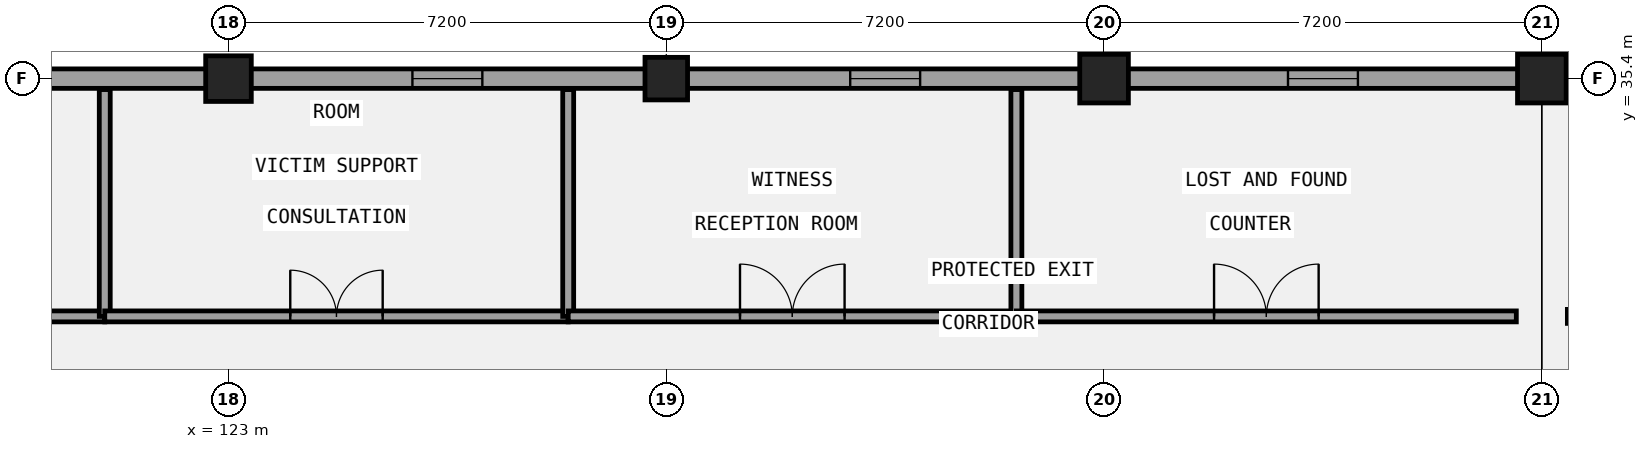
"""IFC4 building model, lengths in metres.
Left out: names, types, materials, properties, quantities, classifications, styles, units other than length and angle.
Written with IfcOpenShell. Run it as: python <this file> out.ifc"""

import sys

from ifc_helpers import new_model, si_unit, direction, frame, frame_2d, origin, origin_2d, place, context, subcontext, project, spatial, rectangle, circle, extrude, element, fill, save


model = new_model("IFC4")
c1 = context("Model", 3, precision=1e-05, world=origin(), true_north=direction((0.0, 1.0)))
c2 = subcontext(c1, "Body", "Model", "MODEL_VIEW")
j1 = project(units=[si_unit("LENGTHUNIT", "METRE"), si_unit("PLANEANGLEUNIT", "RADIAN")], contexts=[c1])
p1 = place(None, origin())
s1 = spatial("IfcSite", under=j1, at=p1, CompositionType="ELEMENT")
p2 = place(p1, origin())
s2 = spatial("IfcBuilding", under=s1, at=p2, CompositionType="ELEMENT")
p3 = place(p2, origin())
s3 = spatial("IfcBuildingStorey", under=s2, at=p3, CompositionType="ELEMENT", Elevation=0.0)
p4 = place(p3, frame((123.0, 35.4, 0.0), z_axis=(0.0, 0.0, 1.0), x_axis=(1.0, 0.0, 0.0)))
e1 = element("IfcColumn", 1, at=p4, inside=s3, PredefinedType="COLUMN", context=c2, shape_type="SweptSolid", body=[
    extrude(rectangle(XDim=0.75, YDim=0.75, at=origin_2d()), origin(), (0.0, 0.0, 1.0), 5.4),
])
p5 = place(p3, frame((130.2, 35.4, 0.0), z_axis=(0.0, 0.0, 1.0), x_axis=(1.0, 0.0, 0.0)))
e2 = element("IfcColumn", 2, at=p5, inside=s3, PredefinedType="COLUMN", context=c2, shape_type="SweptSolid", body=[
    extrude(rectangle(XDim=0.7, YDim=0.7, at=origin_2d()), origin(), (0.0, 0.0, 1.0), 5.4),
])
p6 = place(p3, frame((137.4, 35.4, 0.0), z_axis=(0.0, 0.0, 1.0), x_axis=(1.0, 0.0, 0.0)))
e3 = element("IfcColumn", 3, at=p6, inside=s3, PredefinedType="COLUMN", context=c2, shape_type="SweptSolid", body=[
    extrude(rectangle(XDim=0.8, YDim=0.8, at=origin_2d()), origin(), (0.0, 0.0, 1.0), 5.4),
])
p7 = place(p3, frame((144.6, 35.4, 0.0), z_axis=(0.0, 0.0, 1.0), x_axis=(1.0, 0.0, 0.0)))
e4 = element("IfcColumn", 4, at=p7, inside=s3, PredefinedType="COLUMN", context=c2, shape_type="SweptSolid", body=[
    extrude(circle(Radius=0.4, at=origin_2d()), origin(), (0.0, 0.0, 1.0), 5.4),
])
p8 = place(p3, frame((144.6, 78.44, 0.0), z_axis=(0.0, 0.0, 1.0), x_axis=(0.0, -1.0, 0.0)))
e5 = element("IfcWall", 5, at=p8, inside=s3, PredefinedType="SOLIDWALL", context=c2, shape_type="SweptSolid", body=[
    extrude(rectangle(XDim=42.88, YDim=0.32, at=frame_2d((21.44, 0.0))), origin(), (0.0, 0.0, 1.0), 4.12),
])
p9 = place(p8, frame((38.86, 0.0, 1.0)))
e6 = element("IfcOpeningElement", 6, at=p9, cuts=e5, PredefinedType="OPENING", context=c2, shape_type="SweptSolid", body=[
    extrude(rectangle(XDim=1.0, YDim=2.4, at=frame_2d((0.5, 1.2))), frame((0.0, 0.17, 0.0), z_axis=(0.0, -1.0, 0.0), x_axis=(1.0, 0.0, 0.0)), (0.0, 0.0, 1.0), 0.34),
])
p10 = place(p8, frame((31.74, 0.0, 1.0)))
e7 = element("IfcOpeningElement", 7, at=p10, cuts=e5, PredefinedType="OPENING", context=c2, shape_type="SweptSolid", body=[
    extrude(rectangle(XDim=1.0, YDim=2.4, at=frame_2d((0.5, 1.2))), frame((0.0, 0.17, 0.0), z_axis=(0.0, -1.0, 0.0), x_axis=(1.0, 0.0, 0.0)), (0.0, 0.0, 1.0), 0.34),
])
p11 = place(p8, frame((24.54, 0.0, 1.0)))
e8 = element("IfcOpeningElement", 8, at=p11, cuts=e5, PredefinedType="OPENING", context=c2, shape_type="SweptSolid", body=[
    extrude(rectangle(XDim=1.0, YDim=2.4, at=frame_2d((0.5, 1.2))), frame((0.0, 0.17, 0.0), z_axis=(0.0, -1.0, 0.0), x_axis=(1.0, 0.0, 0.0)), (0.0, 0.0, 1.0), 0.34),
])
p12 = place(p8, frame((17.34, 0.0, 1.0)))
e9 = element("IfcOpeningElement", 9, at=p12, cuts=e5, PredefinedType="OPENING", context=c2, shape_type="SweptSolid", body=[
    extrude(rectangle(XDim=1.0, YDim=2.4, at=frame_2d((0.5, 1.2))), frame((0.0, 0.17, 0.0), z_axis=(0.0, -1.0, 0.0), x_axis=(1.0, 0.0, 0.0)), (0.0, 0.0, 1.0), 0.34),
])
p13 = place(p8, frame((10.14, 0.0, 1.0)))
e10 = element("IfcOpeningElement", 10, at=p13, cuts=e5, PredefinedType="OPENING", context=c2, shape_type="SweptSolid", body=[
    extrude(rectangle(XDim=1.0, YDim=2.4, at=frame_2d((0.5, 1.2))), frame((0.0, 0.17, 0.0), z_axis=(0.0, -1.0, 0.0), x_axis=(1.0, 0.0, 0.0)), (0.0, 0.0, 1.0), 0.34),
])
p14 = place(p8, frame((3.02, 0.0, 1.0)))
e11 = element("IfcOpeningElement", 11, at=p14, cuts=e5, PredefinedType="OPENING", context=c2, shape_type="SweptSolid", body=[
    extrude(rectangle(XDim=1.0, YDim=2.4, at=frame_2d((0.5, 1.2))), frame((0.0, 0.17, 0.0), z_axis=(0.0, -1.0, 0.0), x_axis=(1.0, 0.0, 0.0)), (0.0, 0.0, 1.0), 0.34),
])
p15 = place(p3, frame((144.76, 35.4, 0.0), z_axis=(0.0, 0.0, 1.0), x_axis=(-1.0, 0.0, 0.0)))
e12 = element("IfcWall", 12, at=p15, inside=s3, PredefinedType="SOLIDWALL", context=c2, shape_type="SweptSolid", body=[
    extrude(rectangle(XDim=50.31, YDim=0.32, at=frame_2d((25.155, 0.0))), origin(), (0.0, 0.0, 1.0), 4.12),
])
p16 = place(p15, frame((46.26, 0.0, 1.0)))
e13 = element("IfcOpeningElement", 13, at=p16, cuts=e12, PredefinedType="OPENING", context=c2, shape_type="SweptSolid", body=[
    extrude(rectangle(XDim=1.15, YDim=1.4, at=frame_2d((0.575, 0.7))), frame((0.0, 0.17, 0.0), z_axis=(0.0, -1.0, 0.0), x_axis=(1.0, 0.0, 0.0)), (0.0, 0.0, 1.0), 0.34),
])
p17 = place(p15, frame((39.185, 0.0, 1.0)))
e14 = element("IfcOpeningElement", 14, at=p17, cuts=e12, PredefinedType="OPENING", context=c2, shape_type="SweptSolid", body=[
    extrude(rectangle(XDim=1.15, YDim=1.4, at=frame_2d((0.575, 0.7))), frame((0.0, 0.17, 0.0), z_axis=(0.0, -1.0, 0.0), x_axis=(1.0, 0.0, 0.0)), (0.0, 0.0, 1.0), 0.34),
])
p18 = place(p15, frame((31.985, 0.0, 1.0)))
e15 = element("IfcOpeningElement", 15, at=p18, cuts=e12, PredefinedType="OPENING", context=c2, shape_type="SweptSolid", body=[
    extrude(rectangle(XDim=1.15, YDim=1.4, at=frame_2d((0.575, 0.7))), frame((0.0, 0.17, 0.0), z_axis=(0.0, -1.0, 0.0), x_axis=(1.0, 0.0, 0.0)), (0.0, 0.0, 1.0), 0.34),
])
p19 = place(p15, frame((24.785, 0.0, 1.0)))
e16 = element("IfcOpeningElement", 16, at=p19, cuts=e12, PredefinedType="OPENING", context=c2, shape_type="SweptSolid", body=[
    extrude(rectangle(XDim=1.15, YDim=1.4, at=frame_2d((0.575, 0.7))), frame((0.0, 0.17, 0.0), z_axis=(0.0, -1.0, 0.0), x_axis=(1.0, 0.0, 0.0)), (0.0, 0.0, 1.0), 0.34),
])
p20 = place(p15, frame((17.585, 0.0, 1.0)))
e17 = element("IfcOpeningElement", 17, at=p20, cuts=e12, PredefinedType="OPENING", context=c2, shape_type="SweptSolid", body=[
    extrude(rectangle(XDim=1.15, YDim=1.4, at=frame_2d((0.575, 0.7))), frame((0.0, 0.17, 0.0), z_axis=(0.0, -1.0, 0.0), x_axis=(1.0, 0.0, 0.0)), (0.0, 0.0, 1.0), 0.34),
])
p21 = place(p15, frame((10.385, 0.0, 1.0)))
e18 = element("IfcOpeningElement", 18, at=p21, cuts=e12, PredefinedType="OPENING", context=c2, shape_type="SweptSolid", body=[
    extrude(rectangle(XDim=1.15, YDim=1.4, at=frame_2d((0.575, 0.7))), frame((0.0, 0.17, 0.0), z_axis=(0.0, -1.0, 0.0), x_axis=(1.0, 0.0, 0.0)), (0.0, 0.0, 1.0), 0.34),
])
p22 = place(p15, frame((3.185, 0.0, 1.0)))
e19 = element("IfcOpeningElement", 19, at=p22, cuts=e12, PredefinedType="OPENING", context=c2, shape_type="SweptSolid", body=[
    extrude(rectangle(XDim=1.15, YDim=1.4, at=frame_2d((0.575, 0.7))), frame((0.0, 0.17, 0.0), z_axis=(0.0, -1.0, 0.0), x_axis=(1.0, 0.0, 0.0)), (0.0, 0.0, 1.0), 0.34),
])
p23 = place(p3, frame((110.443, 31.49, 0.0), z_axis=(0.0, 0.0, 1.0), x_axis=(1.0, 0.0, 0.0)))
e20 = element("IfcWall", 20, at=p23, inside=s3, PredefinedType="PARTITIONING", context=c2, shape_type="SweptSolid", body=[
    extrude(rectangle(XDim=10.522, YDim=0.18, at=frame_2d((5.261, 0.0))), origin(), (0.0, 0.0, 1.0), 5.12),
])
p24 = place(p23, frame((4.501, 0.0, 0.0)))
e21 = element("IfcOpeningElement", 21, at=p24, cuts=e20, PredefinedType="OPENING", context=c2, shape_type="SweptSolid", body=[
    extrude(rectangle(XDim=1.52, YDim=2.22, at=frame_2d((0.76, 1.11))), frame((0.0, 0.1, 0.0), z_axis=(0.0, -1.0, 0.0), x_axis=(1.0, 0.0, 0.0)), (0.0, 0.0, 1.0), 0.2),
])
p25 = place(p3, frame((120.965, 31.49, 0.0), z_axis=(0.0, 0.0, 1.0), x_axis=(0.0, 1.0, 0.0)))
e22 = element("IfcWall", 22, at=p25, inside=s3, PredefinedType="PARTITIONING", context=c2, shape_type="SweptSolid", body=[
    extrude(rectangle(XDim=3.73, YDim=0.18, at=frame_2d((1.865, 0.0))), origin(), (0.0, 0.0, 1.0), 5.12),
])
p26 = place(p3, frame((120.965, 31.49, 0.0), z_axis=(0.0, 0.0, 1.0), x_axis=(1.0, 0.0, 0.0)))
e23 = element("IfcWall", 23, at=p26, inside=s3, PredefinedType="PARTITIONING", context=c2, shape_type="SweptSolid", body=[
    extrude(rectangle(XDim=7.622, YDim=0.18, at=frame_2d((3.811, 0.0))), origin(), (0.0, 0.0, 1.0), 5.12),
])
p27 = place(p26, frame((3.051, 0.0, 0.0)))
e24 = element("IfcOpeningElement", 24, at=p27, cuts=e23, PredefinedType="OPENING", context=c2, shape_type="SweptSolid", body=[
    extrude(rectangle(XDim=1.52, YDim=2.35, at=frame_2d((0.76, 1.175))), frame((0.0, 0.1, 0.0), z_axis=(0.0, -1.0, 0.0), x_axis=(1.0, 0.0, 0.0)), (0.0, 0.0, 1.0), 0.2),
])
p28 = place(p3, frame((128.587, 31.49, 0.0), z_axis=(0.0, 0.0, 1.0), x_axis=(0.0, 1.0, 0.0)))
e25 = element("IfcWall", 25, at=p28, inside=s3, PredefinedType="PARTITIONING", context=c2, shape_type="SweptSolid", body=[
    extrude(rectangle(XDim=3.73, YDim=0.18, at=frame_2d((1.865, 0.0))), origin(), (0.0, 0.0, 1.0), 5.12),
])
p29 = place(p3, frame((128.587, 31.49, 0.0), z_axis=(0.0, 0.0, 1.0), x_axis=(1.0, 0.0, 0.0)))
e26 = element("IfcWall", 26, at=p29, inside=s3, PredefinedType="PARTITIONING", context=c2, shape_type="SweptSolid", body=[
    extrude(rectangle(XDim=7.371, YDim=0.18, at=frame_2d((3.686, 0.0))), origin(), (0.0, 0.0, 1.0), 5.12),
])
p30 = place(p29, frame((2.825, 0.0, 0.0)))
e27 = element("IfcOpeningElement", 27, at=p30, cuts=e26, PredefinedType="OPENING", context=c2, shape_type="SweptSolid", body=[
    extrude(rectangle(XDim=1.72, YDim=2.1, at=frame_2d((0.86, 1.05))), frame((0.0, 0.1, 0.0), z_axis=(0.0, -1.0, 0.0), x_axis=(1.0, 0.0, 0.0)), (0.0, 0.0, 1.0), 0.2),
])
p31 = place(p3, frame((135.958, 31.49, 0.0), z_axis=(0.0, 0.0, 1.0), x_axis=(0.0, 1.0, 0.0)))
e28 = element("IfcWall", 28, at=p31, inside=s3, PredefinedType="PARTITIONING", context=c2, shape_type="SweptSolid", body=[
    extrude(rectangle(XDim=3.73, YDim=0.18, at=frame_2d((1.865, 0.0))), origin(), (0.0, 0.0, 1.0), 5.12),
])
p32 = place(p3, frame((135.958, 31.49, 0.0), z_axis=(0.0, 0.0, 1.0), x_axis=(1.0, 0.0, 0.0)))
e29 = element("IfcWall", 29, at=p32, inside=s3, PredefinedType="PARTITIONING", context=c2, shape_type="SweptSolid", body=[
    extrude(rectangle(XDim=8.222, YDim=0.18, at=frame_2d((4.111, 0.0))), origin(), (0.0, 0.0, 1.0), 5.12),
])
p33 = place(p32, frame((3.251, 0.0, 0.0)))
e30 = element("IfcOpeningElement", 30, at=p33, cuts=e29, PredefinedType="OPENING", context=c2, shape_type="SweptSolid", body=[
    extrude(rectangle(XDim=1.72, YDim=2.22, at=frame_2d((0.86, 1.11))), frame((0.0, 0.1, 0.0), z_axis=(0.0, -1.0, 0.0), x_axis=(1.0, 0.0, 0.0)), (0.0, 0.0, 1.0), 0.2),
])
p34 = place(p3, frame((145.02, 31.49, 0.0), z_axis=(0.0, 0.0, 1.0), x_axis=(1.0, 0.0, 0.0)))
e31 = element("IfcWall", 31, at=p34, inside=s3, PredefinedType="PARTITIONING", context=c2, shape_type="SweptSolid", body=[
    extrude(rectangle(XDim=9.52, YDim=0.23, at=frame_2d((4.76, 0.0))), origin(), (0.0, 0.0, 1.0), 4.57),
])
p35 = place(p34, frame((3.9, 0.0, 0.0)))
e32 = element("IfcOpeningElement", 32, at=p35, cuts=e31, PredefinedType="OPENING", context=c2, shape_type="SweptSolid", body=[
    extrude(rectangle(XDim=1.72, YDim=2.22, at=frame_2d((0.86, 1.11))), frame((0.0, 0.125, 0.0), z_axis=(0.0, -1.0, 0.0), x_axis=(1.0, 0.0, 0.0)), (0.0, 0.0, 1.0), 0.25),
])
p36 = place(p20, origin())
e33 = element("IfcWindow", 33, at=p36, inside=s3, PartitioningType="SINGLE_PANEL", PredefinedType="WINDOW", context=c2, shape_type="SweptSolid", body=[
    extrude(rectangle(XDim=1.15, YDim=1.4, at=frame_2d((0.575, 0.7))), frame((0.0, 0.03, 0.0), z_axis=(0.0, -1.0, 0.0), x_axis=(1.0, 0.0, 0.0)), (0.0, 0.0, 1.0), 0.06),
])
fill(e17, e33)
p37 = place(p21, origin())
e34 = element("IfcWindow", 34, at=p37, inside=s3, PartitioningType="SINGLE_PANEL", PredefinedType="WINDOW", context=c2, shape_type="SweptSolid", body=[
    extrude(rectangle(XDim=1.15, YDim=1.4, at=frame_2d((0.575, 0.7))), frame((0.0, 0.03, 0.0), z_axis=(0.0, -1.0, 0.0), x_axis=(1.0, 0.0, 0.0)), (0.0, 0.0, 1.0), 0.06),
])
fill(e18, e34)
p38 = place(p22, origin())
e35 = element("IfcWindow", 35, at=p38, inside=s3, PartitioningType="SINGLE_PANEL", PredefinedType="WINDOW", context=c2, shape_type="SweptSolid", body=[
    extrude(rectangle(XDim=1.15, YDim=1.4, at=frame_2d((0.575, 0.7))), frame((0.0, 0.03, 0.0), z_axis=(0.0, -1.0, 0.0), x_axis=(1.0, 0.0, 0.0)), (0.0, 0.0, 1.0), 0.06),
])
fill(e19, e35)
p39 = place(p27, origin())
e36 = element("IfcDoor", 36, at=p39, inside=s3, OperationType="DOUBLE_DOOR_SINGLE_SWING", PredefinedType="DOOR", context=c2, shape_type="SweptSolid", body=[
    extrude(rectangle(XDim=1.52, YDim=2.35, at=frame_2d((0.76, 1.175))), frame((0.0, 0.025, 0.0), z_axis=(0.0, -1.0, 0.0), x_axis=(1.0, 0.0, 0.0)), (0.0, 0.0, 1.0), 0.05),
])
fill(e24, e36)
p40 = place(p30, origin())
e37 = element("IfcDoor", 37, at=p40, inside=s3, OperationType="DOUBLE_DOOR_SINGLE_SWING", PredefinedType="DOOR", context=c2, shape_type="SweptSolid", body=[
    extrude(rectangle(XDim=1.72, YDim=2.1, at=frame_2d((0.86, 1.05))), frame((0.0, 0.025, 0.0), z_axis=(0.0, -1.0, 0.0), x_axis=(1.0, 0.0, 0.0)), (0.0, 0.0, 1.0), 0.05),
])
fill(e27, e37)
p41 = place(p33, origin())
e38 = element("IfcDoor", 38, at=p41, inside=s3, OperationType="DOUBLE_DOOR_SINGLE_SWING", PredefinedType="DOOR", context=c2, shape_type="SweptSolid", body=[
    extrude(rectangle(XDim=1.72, YDim=2.22, at=frame_2d((0.86, 1.11))), frame((0.0, 0.025, 0.0), z_axis=(0.0, -1.0, 0.0), x_axis=(1.0, 0.0, 0.0)), (0.0, 0.0, 1.0), 0.05),
])
fill(e30, e38)
save(model, sys.argv[1])
